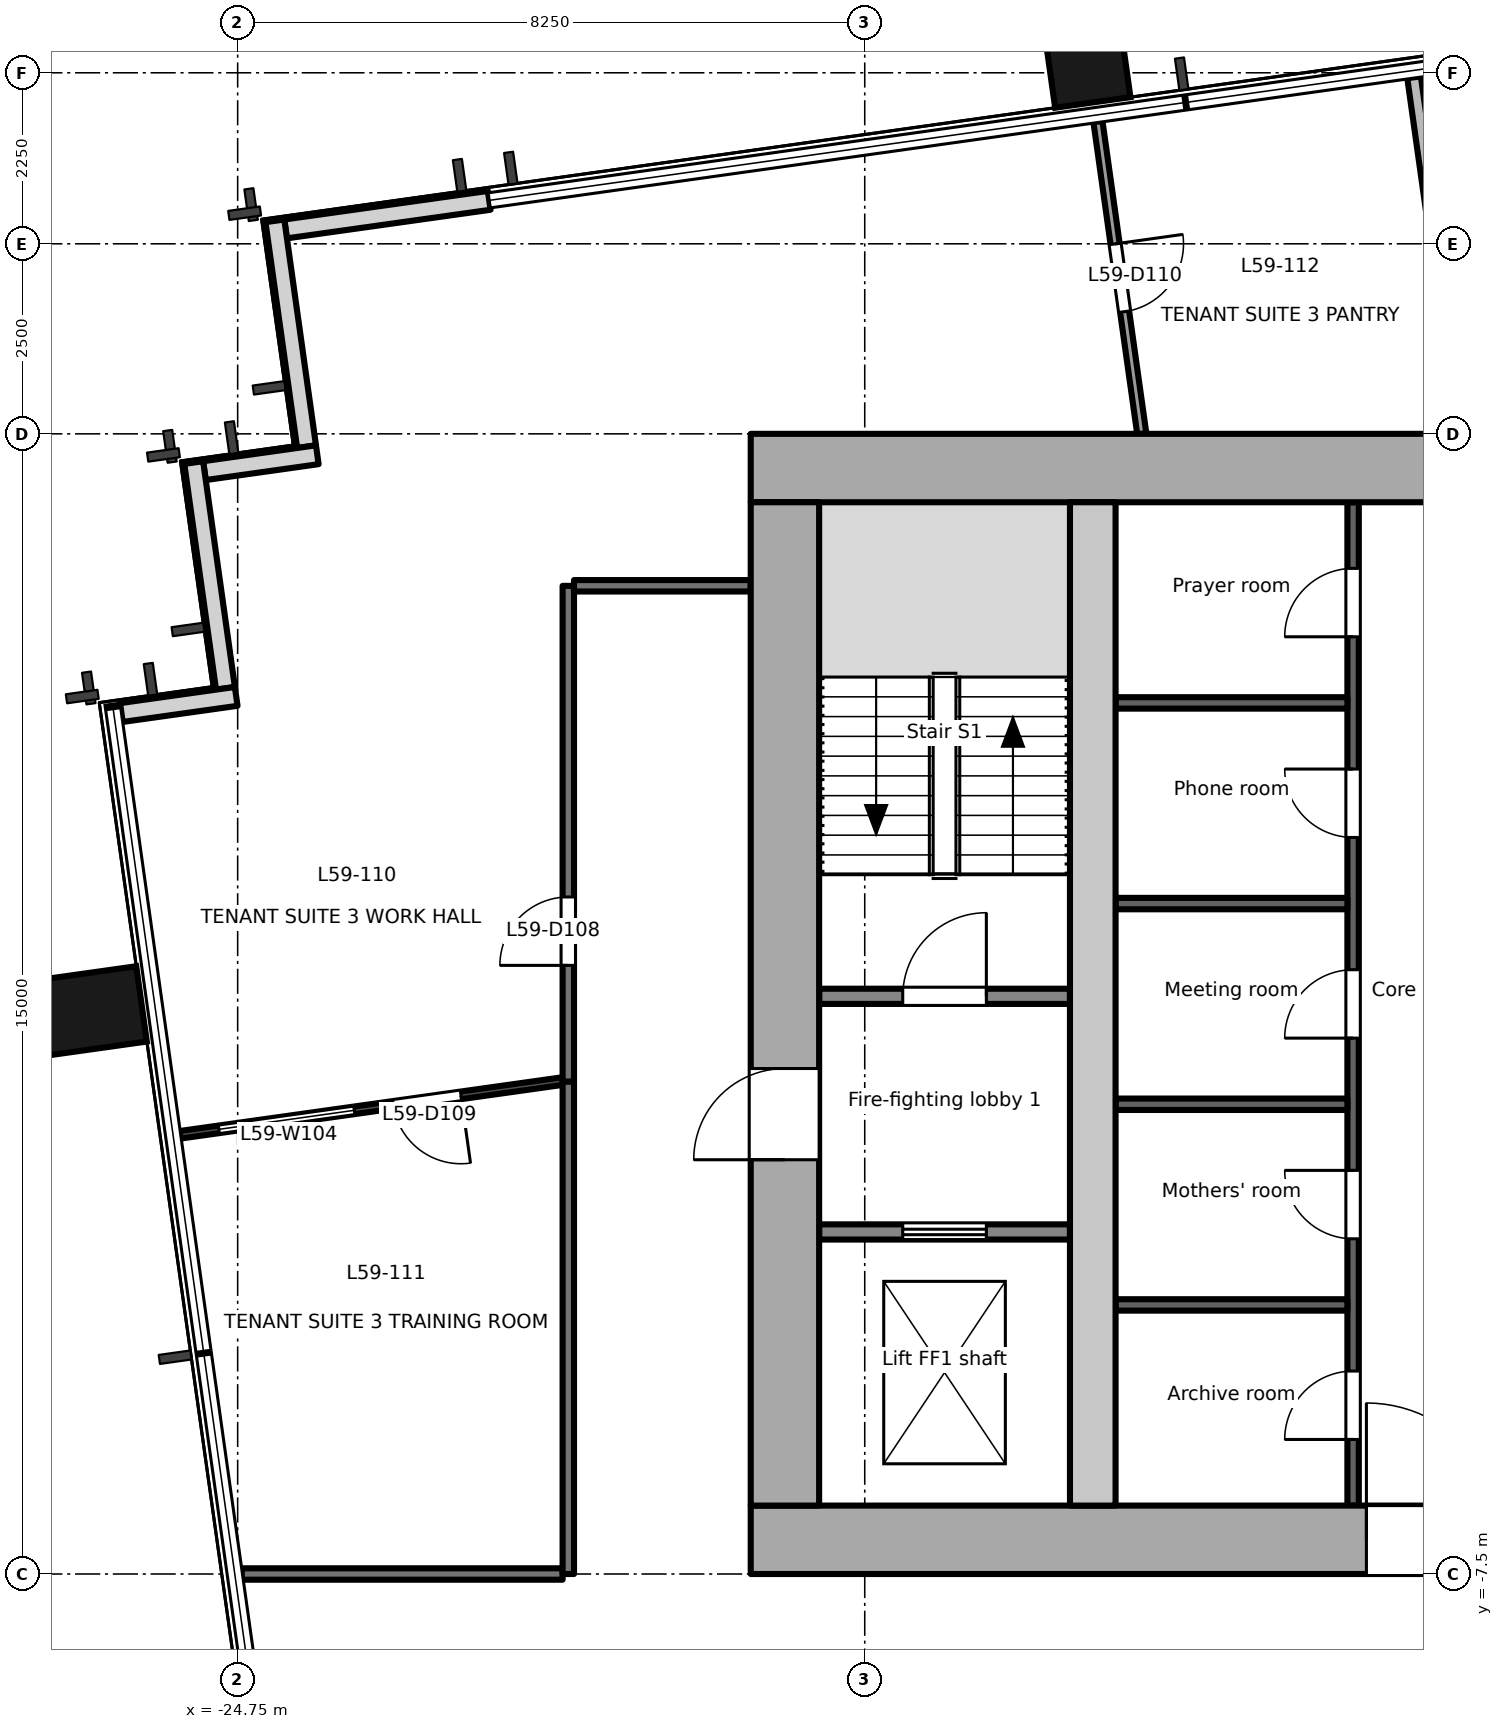
"""IFC4 building model, lengths in metres.
Left out: names, types, materials, properties, quantities, classifications, styles, units other than length and angle.
Written with IfcOpenShell. Run it as: python <this file> out.ifc"""

import sys

from ifc_helpers import new_model, si_unit, direction, frame, frame_2d, origin, origin_2d, place, context, subcontext, project, spatial, rectangle, extrude, element, fill, save


model = new_model("IFC4")
c1 = context("Model", 3, precision=1e-05, world=origin(), true_north=direction((0.0, 1.0)))
c2 = subcontext(c1, "Body", "Model", "MODEL_VIEW")
j1 = project(units=[si_unit("LENGTHUNIT", "METRE"), si_unit("PLANEANGLEUNIT", "RADIAN")], contexts=[c1])
p1 = place(None, origin())
s1 = spatial("IfcSite", under=j1, at=p1, CompositionType="ELEMENT")
p2 = place(p1, origin())
s2 = spatial("IfcBuilding", under=s1, at=p2, CompositionType="ELEMENT")
p3 = place(p2, frame((0.0, 0.0, 259.0)))
s3 = spatial("IfcBuildingStorey", under=s2, at=p3, CompositionType="ELEMENT", Elevation=259.0)
for number, where, z_axis, x_axis in (
    (1, (-26.906, -0.125, -0.2), (0.0, 0.0, 1.0), (-0.139, 0.99, 0.0)),
    (2, (-13.625, 12.751, -0.2), (0.0, 0.0, 1.0), (0.99, 0.139, 0.0)),
):
    element("IfcColumn", number, at=place(p3, frame(where, z_axis=z_axis, x_axis=x_axis)), inside=s3, PredefinedType="COLUMN", context=c2, shape_type="SweptSolid", body=[
        extrude(rectangle(XDim=1.0, YDim=1.8, at=origin_2d()), origin(), (0.0, 0.0, 1.0), 3.9),
    ])
p4 = place(p3, frame((-21.44, 10.572, 0.0), z_axis=(0.0, 0.0, 1.0), x_axis=(-0.990293105353, -0.138994839796, 0.0)))
e3 = element("IfcWall", 3, at=p4, inside=s3, PredefinedType="SOLIDWALL", context=c2, shape_type="SweptSolid", body=[
    extrude(rectangle(XDim=2.705, YDim=0.25, at=frame_2d((1.353, 0.0))), origin(), (0.0, 0.0, 1.0), 3.7),
])
p5 = place(p3, frame((-24.26, 10.302, 0.0), z_axis=(0.0, 0.0, 1.0), x_axis=(0.138994228812, -0.990293191109, 0.0)))
e4 = element("IfcWall", 4, at=p5, inside=s3, PredefinedType="SOLIDWALL", context=c2, shape_type="SweptSolid", body=[
    extrude(rectangle(XDim=3.0, YDim=0.25, at=frame_2d((1.5, 0.0))), origin(), (0.0, 0.0, 1.0), 3.7),
])
p6 = place(p3, frame((-23.702, 7.225, 0.0), z_axis=(0.0, 0.0, 1.0), x_axis=(-0.990243596651, -0.13934711799, 0.0)))
e5 = element("IfcWall", 5, at=p6, inside=s3, PredefinedType="SOLIDWALL", context=c2, shape_type="SweptSolid", body=[
    extrude(rectangle(XDim=1.5, YDim=0.25, at=frame_2d((0.75, 0.0))), origin(), (0.0, 0.0, 1.0), 3.7),
])
p7 = place(p3, frame((-25.328, 7.122, 0.0), z_axis=(0.0, 0.0, 1.0), x_axis=(0.139358350296, -0.990242015975, 0.0)))
e6 = element("IfcWall", 6, at=p7, inside=s3, PredefinedType="SOLIDWALL", context=c2, shape_type="SweptSolid", body=[
    extrude(rectangle(XDim=2.999, YDim=0.25, at=frame_2d((1.5, 0.0))), origin(), (0.0, 0.0, 1.0), 3.7),
])
p8 = place(p3, frame((-24.769, 4.046, 0.0), z_axis=(0.0, 0.0, 1.0), x_axis=(-0.990260716096, -0.139225407725, 0.0)))
e7 = element("IfcWall", 7, at=p8, inside=s3, PredefinedType="SOLIDWALL", context=c2, shape_type="SweptSolid", body=[
    extrude(rectangle(XDim=1.526, YDim=0.25, at=frame_2d((0.763, 0.0))), origin(), (0.0, 0.0, 1.0), 3.7),
])
p9 = place(p3, frame((-18.0, -7.05, -0.2), z_axis=(0.0, 0.0, 1.0), x_axis=(1.0, 0.0, 0.0)))
e8 = element("IfcWall", 8, at=p9, inside=s3, PredefinedType="SHEAR", context=c2, shape_type="SweptSolid", body=[
    extrude(rectangle(XDim=36.0, YDim=0.9, at=frame_2d((18.0, 0.0))), origin(), (0.0, 0.0, 1.0), 3.9),
])
p10 = place(p9, frame((8.1, 0.0, 0.2)))
e9 = element("IfcOpeningElement", 9, at=p10, cuts=e8, PredefinedType="OPENING", context=c2, shape_type="SweptSolid", body=[
    extrude(rectangle(XDim=1.8, YDim=2.1, at=frame_2d((0.9, 1.05))), frame((0.0, 0.46, 0.0), z_axis=(0.0, -1.0, 0.0), x_axis=(1.0, 0.0, 0.0)), (0.0, 0.0, 1.0), 0.921),
])
p11 = place(p9, frame((16.8, 0.0, 0.2)))
e10 = element("IfcOpeningElement", 10, at=p11, cuts=e8, PredefinedType="OPENING", context=c2, shape_type="SweptSolid", body=[
    extrude(rectangle(XDim=2.4, YDim=2.1, at=frame_2d((1.2, 1.05))), frame((0.0, 0.46, 0.0), z_axis=(0.0, -1.0, 0.0), x_axis=(1.0, 0.0, 0.0)), (0.0, 0.0, 1.0), 0.921),
])
p12 = place(p9, frame((26.1, 0.0, 0.2)))
e11 = element("IfcOpeningElement", 11, at=p12, cuts=e8, PredefinedType="OPENING", context=c2, shape_type="SweptSolid", body=[
    extrude(rectangle(XDim=2.4, YDim=2.1, at=frame_2d((1.2, 1.05))), frame((0.0, 0.46, 0.0), z_axis=(0.0, -1.0, 0.0), x_axis=(1.0, 0.0, 0.0)), (0.0, 0.0, 1.0), 0.921),
])
p13 = place(p3, frame((-18.0, 7.05, -0.2), z_axis=(0.0, 0.0, 1.0), x_axis=(1.0, 0.0, 0.0)))
e12 = element("IfcWall", 12, at=p13, inside=s3, PredefinedType="SHEAR", context=c2, shape_type="SweptSolid", body=[
    extrude(rectangle(XDim=36.0, YDim=0.9, at=frame_2d((18.0, 0.0))), origin(), (0.0, 0.0, 1.0), 3.9),
])
p14 = place(p3, frame((-17.55, -6.6, -0.2), z_axis=(0.0, 0.0, 1.0), x_axis=(0.0, 1.0, 0.0)))
e13 = element("IfcWall", 13, at=p14, inside=s3, PredefinedType="SHEAR", context=c2, shape_type="SweptSolid", body=[
    extrude(rectangle(XDim=13.2, YDim=0.9, at=frame_2d((6.6, 0.0))), origin(), (0.0, 0.0, 1.0), 3.9),
])
p15 = place(p14, frame((4.55, 0.0, 0.2)))
e14 = element("IfcOpeningElement", 14, at=p15, cuts=e13, PredefinedType="OPENING", context=c2, shape_type="SweptSolid", body=[
    extrude(rectangle(XDim=1.2, YDim=2.1, at=frame_2d((0.6, 1.05))), frame((0.0, 0.46, 0.0), z_axis=(0.0, -1.0, 0.0), x_axis=(1.0, 0.0, 0.0)), (0.0, 0.0, 1.0), 0.921),
])
p16 = place(p3, frame((-13.5, -6.6, -0.2), z_axis=(0.0, 0.0, 1.0), x_axis=(0.0, 1.0, 0.0)))
e15 = element("IfcWall", 15, at=p16, inside=s3, PredefinedType="SHEAR", context=c2, shape_type="SweptSolid", body=[
    extrude(rectangle(XDim=13.2, YDim=0.6, at=frame_2d((6.6, 0.0))), origin(), (0.0, 0.0, 1.0), 3.9),
])
p17 = place(p3, frame((-17.1, -3.0, 0.0), z_axis=(0.0, 0.0, 1.0), x_axis=(1.0, 0.0, 0.0)))
e16 = element("IfcWall", 16, at=p17, inside=s3, PredefinedType="PARTITIONING", context=c2, shape_type="SweptSolid", body=[
    extrude(rectangle(XDim=3.3, YDim=0.2, at=frame_2d((1.65, 0.0))), origin(), (0.0, 0.0, 1.0), 3.7),
])
p18 = place(p17, frame((1.1, 0.0, 0.0)))
e17 = element("IfcOpeningElement", 17, at=p18, cuts=e16, PredefinedType="OPENING", context=c2, shape_type="SweptSolid", body=[
    extrude(rectangle(XDim=1.1, YDim=2.1, at=frame_2d((0.55, 1.05))), frame((0.0, 0.111, 0.0), z_axis=(0.0, -1.0, 0.0), x_axis=(1.0, 0.0, 0.0)), (0.0, 0.0, 1.0), 0.221),
])
p19 = place(p3, frame((-17.1, 0.1, 0.0), z_axis=(0.0, 0.0, 1.0), x_axis=(1.0, 0.0, 0.0)))
e18 = element("IfcWall", 18, at=p19, inside=s3, PredefinedType="PARTITIONING", context=c2, shape_type="SweptSolid", body=[
    extrude(rectangle(XDim=3.3, YDim=0.2, at=frame_2d((1.65, 0.0))), origin(), (0.0, 0.0, 1.0), 3.7),
])
p20 = place(p19, frame((1.1, 0.0, 0.0)))
e19 = element("IfcOpeningElement", 19, at=p20, cuts=e18, PredefinedType="OPENING", context=c2, shape_type="SweptSolid", body=[
    extrude(rectangle(XDim=1.1, YDim=2.1, at=frame_2d((0.55, 1.05))), frame((0.0, 0.111, 0.0), z_axis=(0.0, -1.0, 0.0), x_axis=(1.0, 0.0, 0.0)), (0.0, 0.0, 1.0), 0.221),
])
p21 = place(p3, frame((-10.075, -6.6, 0.0), z_axis=(0.0, 0.0, 1.0), x_axis=(0.0, 1.0, 0.0)))
e20 = element("IfcWall", 20, at=p21, inside=s3, PredefinedType="PARTITIONING", context=c2, shape_type="SweptSolid", body=[
    extrude(rectangle(XDim=13.2, YDim=0.15, at=frame_2d((6.6, 0.0))), origin(), (0.0, 0.0, 1.0), 3.7),
])
p22 = place(p21, frame((0.87, 0.0, 0.0)))
e21 = element("IfcOpeningElement", 21, at=p22, cuts=e20, PredefinedType="OPENING", context=c2, shape_type="SweptSolid", body=[
    extrude(rectangle(XDim=0.9, YDim=2.1, at=frame_2d((0.45, 1.05))), frame((0.0, 0.085, 0.0), z_axis=(0.0, -1.0, 0.0), x_axis=(1.0, 0.0, 0.0)), (0.0, 0.0, 1.0), 0.171),
])
p23 = place(p21, frame((3.51, 0.0, 0.0)))
e22 = element("IfcOpeningElement", 22, at=p23, cuts=e20, PredefinedType="OPENING", context=c2, shape_type="SweptSolid", body=[
    extrude(rectangle(XDim=0.9, YDim=2.1, at=frame_2d((0.45, 1.05))), frame((0.0, 0.085, 0.0), z_axis=(0.0, -1.0, 0.0), x_axis=(1.0, 0.0, 0.0)), (0.0, 0.0, 1.0), 0.171),
])
p24 = place(p21, frame((6.15, 0.0, 0.0)))
e23 = element("IfcOpeningElement", 23, at=p24, cuts=e20, PredefinedType="OPENING", context=c2, shape_type="SweptSolid", body=[
    extrude(rectangle(XDim=0.9, YDim=2.1, at=frame_2d((0.45, 1.05))), frame((0.0, 0.085, 0.0), z_axis=(0.0, -1.0, 0.0), x_axis=(1.0, 0.0, 0.0)), (0.0, 0.0, 1.0), 0.171),
])
p25 = place(p21, frame((8.79, 0.0, 0.0)))
e24 = element("IfcOpeningElement", 24, at=p25, cuts=e20, PredefinedType="OPENING", context=c2, shape_type="SweptSolid", body=[
    extrude(rectangle(XDim=0.9, YDim=2.1, at=frame_2d((0.45, 1.05))), frame((0.0, 0.085, 0.0), z_axis=(0.0, -1.0, 0.0), x_axis=(1.0, 0.0, 0.0)), (0.0, 0.0, 1.0), 0.171),
])
p26 = place(p21, frame((11.43, 0.0, 0.0)))
e25 = element("IfcOpeningElement", 25, at=p26, cuts=e20, PredefinedType="OPENING", context=c2, shape_type="SweptSolid", body=[
    extrude(rectangle(XDim=0.9, YDim=2.1, at=frame_2d((0.45, 1.05))), frame((0.0, 0.085, 0.0), z_axis=(0.0, -1.0, 0.0), x_axis=(1.0, 0.0, 0.0)), (0.0, 0.0, 1.0), 0.171),
])
for number, where, z_axis, x_axis in (
    (26, (-13.2, -3.96, 0.0), (0.0, 0.0, 1.0), (1.0, 0.0, 0.0)),
    (27, (-13.2, -1.32, 0.0), (0.0, 0.0, 1.0), (1.0, 0.0, 0.0)),
    (28, (-13.2, 1.32, 0.0), (0.0, 0.0, 1.0), (1.0, 0.0, 0.0)),
    (29, (-13.2, 3.96, 0.0), (0.0, 0.0, 1.0), (1.0, 0.0, 0.0)),
):
    element("IfcWall", number, at=place(p3, frame(where, z_axis=z_axis, x_axis=x_axis)), inside=s3, PredefinedType="PARTITIONING", context=c2, shape_type="SweptSolid", body=[
        extrude(rectangle(XDim=3.05, YDim=0.15, at=frame_2d((1.525, 0.0))), origin(), (0.0, 0.0, 1.0), 3.7),
    ])
p27 = place(p3, frame((-20.4, -1.024, 0.0), z_axis=(0.0, 0.0, 1.0), x_axis=(0.0, 1.0, 0.0)))
e30 = element("IfcWall", 30, at=p27, inside=s3, PredefinedType="PARTITIONING", context=c2, shape_type="SweptSolid", body=[
    extrude(rectangle(XDim=6.524, YDim=0.15, at=frame_2d((3.262, 0.0))), origin(), (0.0, 0.0, 1.0), 3.3),
])
p28 = place(p27, frame((1.531, 0.0, 0.0)))
e31 = element("IfcOpeningElement", 31, at=p28, cuts=e30, PredefinedType="OPENING", context=c2, shape_type="SweptSolid", body=[
    extrude(rectangle(XDim=0.9, YDim=2.1, at=frame_2d((0.45, 1.05))), frame((0.0, 0.085, 0.0), z_axis=(0.0, -1.0, 0.0), x_axis=(1.0, 0.0, 0.0)), (0.0, 0.0, 1.0), 0.171),
])
p29 = place(p3, frame((-20.325, 5.501, 0.0), z_axis=(0.0, 0.0, 1.0), x_axis=(1.0, 0.0, 0.0)))
e32 = element("IfcWall", 32, at=p29, inside=s3, PredefinedType="PARTITIONING", context=c2, shape_type="SweptSolid", body=[
    extrude(rectangle(XDim=2.325, YDim=0.15, at=frame_2d((1.163, 0.0))), origin(), (0.0, 0.0, 1.0), 3.7),
])
p30 = place(p3, frame((-24.696, -7.5, 0.0), z_axis=(0.0, 0.0, 1.0), x_axis=(1.0, 0.0, 0.0)))
e33 = element("IfcWall", 33, at=p30, inside=s3, PredefinedType="PARTITIONING", context=c2, shape_type="SweptSolid", body=[
    extrude(rectangle(XDim=4.221, YDim=0.15, at=frame_2d((2.11, 0.0))), origin(), (0.0, 0.0, 1.0), 3.7),
])
p31 = place(p3, frame((-20.4, -7.5, 0.0), z_axis=(0.0, 0.0, 1.0), x_axis=(0.0, 1.0, 0.0)))
e34 = element("IfcWall", 34, at=p31, inside=s3, PredefinedType="PARTITIONING", context=c2, shape_type="SweptSolid", body=[
    extrude(rectangle(XDim=6.476, YDim=0.15, at=frame_2d((3.238, 0.0))), origin(), (0.0, 0.0, 1.0), 3.3),
])
p32 = place(p3, frame((-20.468, -1.014, 0.0), z_axis=(0.0, 0.0, 1.0), x_axis=(-0.990280538481, -0.139084345292, 0.0)))
e35 = element("IfcWall", 35, at=p32, inside=s3, PredefinedType="PARTITIONING", context=c2, shape_type="SweptSolid", body=[
    extrude(rectangle(XDim=5.091, YDim=0.1, at=frame_2d((2.545, 0.0))), origin(), (0.0, 0.0, 1.0), 3.7),
])
p33 = place(p32, frame((1.357, 0.0, 0.0)))
e36 = element("IfcOpeningElement", 36, at=p33, cuts=e35, PredefinedType="OPENING", context=c2, shape_type="SweptSolid", body=[
    extrude(rectangle(XDim=0.9, YDim=2.1, at=frame_2d((0.45, 1.05))), frame((0.0, 0.061, 0.0), z_axis=(0.0, -1.0, 0.0), x_axis=(1.0, 0.0, 0.0)), (0.0, 0.0, 1.0), 0.121),
])
p34 = place(p32, frame((2.774, 0.0, 0.9)))
e37 = element("IfcOpeningElement", 37, at=p34, cuts=e35, PredefinedType="OPENING", context=c2, shape_type="SweptSolid", body=[
    extrude(rectangle(XDim=1.8, YDim=1.2, at=frame_2d((0.9, 0.6))), frame((0.0, 0.061, 0.0), z_axis=(0.0, -1.0, 0.0), x_axis=(1.0, 0.0, 0.0)), (0.0, 0.0, 1.0), 0.121),
])
p35 = place(p3, frame((-13.432, 11.607, 0.0), z_axis=(0.0, 0.0, 1.0), x_axis=(0.139105101842, -0.990277623014, 0.0)))
e38 = element("IfcWall", 38, at=p35, inside=s3, PredefinedType="PARTITIONING", context=c2, shape_type="SweptSolid", body=[
    extrude(rectangle(XDim=4.147, YDim=0.12, at=frame_2d((2.074, 0.0))), origin(), (0.0, 0.0, 1.0), 3.4),
])
p36 = place(p35, frame((1.624, 0.0, 0.0)))
e39 = element("IfcOpeningElement", 39, at=p36, cuts=e38, PredefinedType="OPENING", context=c2, shape_type="SweptSolid", body=[
    extrude(rectangle(XDim=0.9, YDim=2.1, at=frame_2d((0.45, 1.05))), frame((0.0, 0.071, 0.0), z_axis=(0.0, -1.0, 0.0), x_axis=(1.0, 0.0, 0.0)), (0.0, 0.0, 1.0), 0.141),
])
p37 = place(p3, frame((-9.273, 12.191, 0.0), z_axis=(0.0, 0.0, 1.0), x_axis=(0.139104789371, -0.990277666907, 0.0)))
e40 = element("IfcWall", 40, at=p37, inside=s3, PredefinedType="PARTITIONING", context=c2, shape_type="SweptSolid", body=[
    extrude(rectangle(XDim=4.737, YDim=0.18, at=frame_2d((2.369, 0.0))), origin(), (0.0, 0.0, 1.0), 3.4),
])
p38 = place(p18, origin())
e41 = element("IfcDoor", 41, at=p38, inside=s3, OperationType="DOUBLE_DOOR_SLIDING", PredefinedType="DOOR", context=c2, shape_type="SweptSolid", body=[
    extrude(rectangle(XDim=1.1, YDim=2.1, at=frame_2d((0.55, 1.05))), frame((0.0, 0.025, 0.0), z_axis=(0.0, -1.0, 0.0), x_axis=(1.0, 0.0, 0.0)), (0.0, 0.0, 1.0), 0.05),
])
fill(e17, e41)
p39 = place(p15, origin())
e42 = element("IfcDoor", 42, at=p39, inside=s3, OperationType="SINGLE_SWING_LEFT", PredefinedType="DOOR", context=c2, shape_type="SweptSolid", body=[
    extrude(rectangle(XDim=1.2, YDim=2.1, at=frame_2d((0.6, 1.05))), frame((0.0, 0.025, 0.0), z_axis=(0.0, -1.0, 0.0), x_axis=(1.0, 0.0, 0.0)), (0.0, 0.0, 1.0), 0.05),
])
fill(e14, e42)
p40 = place(p20, origin())
e43 = element("IfcDoor", 43, at=p40, inside=s3, OperationType="SINGLE_SWING_RIGHT", PredefinedType="DOOR", context=c2, shape_type="SweptSolid", body=[
    extrude(rectangle(XDim=1.1, YDim=2.1, at=frame_2d((0.55, 1.05))), frame((0.0, 0.025, 0.0), z_axis=(0.0, -1.0, 0.0), x_axis=(1.0, 0.0, 0.0)), (0.0, 0.0, 1.0), 0.05),
])
fill(e19, e43)
p41 = place(p22, origin())
e44 = element("IfcDoor", 44, at=p41, inside=s3, OperationType="SINGLE_SWING_LEFT", PredefinedType="DOOR", context=c2, shape_type="SweptSolid", body=[
    extrude(rectangle(XDim=0.9, YDim=2.1, at=frame_2d((0.45, 1.05))), frame((0.0, 0.025, 0.0), z_axis=(0.0, -1.0, 0.0), x_axis=(1.0, 0.0, 0.0)), (0.0, 0.0, 1.0), 0.05),
])
fill(e21, e44)
p42 = place(p23, origin())
e45 = element("IfcDoor", 45, at=p42, inside=s3, OperationType="SINGLE_SWING_RIGHT", PredefinedType="DOOR", context=c2, shape_type="SweptSolid", body=[
    extrude(rectangle(XDim=0.9, YDim=2.1, at=frame_2d((0.45, 1.05))), frame((0.0, 0.025, 0.0), z_axis=(0.0, -1.0, 0.0), x_axis=(1.0, 0.0, 0.0)), (0.0, 0.0, 1.0), 0.05),
])
fill(e22, e45)
p43 = place(p24, origin())
e46 = element("IfcDoor", 46, at=p43, inside=s3, OperationType="SINGLE_SWING_LEFT", PredefinedType="DOOR", context=c2, shape_type="SweptSolid", body=[
    extrude(rectangle(XDim=0.9, YDim=2.1, at=frame_2d((0.45, 1.05))), frame((0.0, 0.025, 0.0), z_axis=(0.0, -1.0, 0.0), x_axis=(1.0, 0.0, 0.0)), (0.0, 0.0, 1.0), 0.05),
])
fill(e23, e46)
p44 = place(p25, origin())
e47 = element("IfcDoor", 47, at=p44, inside=s3, OperationType="SINGLE_SWING_RIGHT", PredefinedType="DOOR", context=c2, shape_type="SweptSolid", body=[
    extrude(rectangle(XDim=0.9, YDim=2.1, at=frame_2d((0.45, 1.05))), frame((0.0, 0.025, 0.0), z_axis=(0.0, -1.0, 0.0), x_axis=(1.0, 0.0, 0.0)), (0.0, 0.0, 1.0), 0.05),
])
fill(e24, e47)
p45 = place(p26, origin())
e48 = element("IfcDoor", 48, at=p45, inside=s3, OperationType="SINGLE_SWING_LEFT", PredefinedType="DOOR", context=c2, shape_type="SweptSolid", body=[
    extrude(rectangle(XDim=0.9, YDim=2.1, at=frame_2d((0.45, 1.05))), frame((0.0, 0.025, 0.0), z_axis=(0.0, -1.0, 0.0), x_axis=(1.0, 0.0, 0.0)), (0.0, 0.0, 1.0), 0.05),
])
fill(e25, e48)
p46 = place(p10, origin())
e49 = element("IfcDoor", 49, at=p46, inside=s3, OperationType="SINGLE_SWING_LEFT", PredefinedType="DOOR", context=c2, shape_type="SweptSolid", body=[
    extrude(rectangle(XDim=1.8, YDim=2.1, at=frame_2d((0.9, 1.05))), frame((0.0, 0.025, 0.0), z_axis=(0.0, -1.0, 0.0), x_axis=(1.0, 0.0, 0.0)), (0.0, 0.0, 1.0), 0.05),
])
fill(e9, e49)
p47 = place(p28, origin())
e50 = element("IfcDoor", 50, at=p47, inside=s3, OperationType="SINGLE_SWING_LEFT", PredefinedType="DOOR", context=c2, shape_type="SweptSolid", body=[
    extrude(rectangle(XDim=0.9, YDim=2.1, at=frame_2d((0.45, 1.05))), frame((0.0, 0.025, 0.0), z_axis=(0.0, -1.0, 0.0), x_axis=(1.0, 0.0, 0.0)), (0.0, 0.0, 1.0), 0.05),
])
fill(e31, e50)
p48 = place(p33, origin())
e51 = element("IfcDoor", 51, at=p48, inside=s3, OperationType="SINGLE_SWING_LEFT", PredefinedType="DOOR", context=c2, shape_type="SweptSolid", body=[
    extrude(rectangle(XDim=0.9, YDim=2.1, at=frame_2d((0.45, 1.05))), frame((0.0, 0.025, 0.0), z_axis=(0.0, -1.0, 0.0), x_axis=(1.0, 0.0, 0.0)), (0.0, 0.0, 1.0), 0.05),
])
fill(e36, e51)
p49 = place(p36, origin())
e52 = element("IfcDoor", 52, at=p49, inside=s3, OperationType="SINGLE_SWING_LEFT", PredefinedType="DOOR", context=c2, shape_type="SweptSolid", body=[
    extrude(rectangle(XDim=0.9, YDim=2.1, at=frame_2d((0.45, 1.05))), frame((0.0, 0.025, 0.0), z_axis=(0.0, -1.0, 0.0), x_axis=(1.0, 0.0, 0.0)), (0.0, 0.0, 1.0), 0.05),
])
fill(e39, e52)
p50 = place(p34, origin())
e53 = element("IfcWindow", 53, at=p50, inside=s3, PartitioningType="SINGLE_PANEL", PredefinedType="WINDOW", context=c2, shape_type="SweptSolid", body=[
    extrude(rectangle(XDim=1.8, YDim=1.2, at=frame_2d((0.9, 0.6))), frame((0.0, 0.03, 0.0), z_axis=(0.0, -1.0, 0.0), x_axis=(1.0, 0.0, 0.0)), (0.0, 0.0, 1.0), 0.06),
])
fill(e37, e53)
save(model, sys.argv[1])
